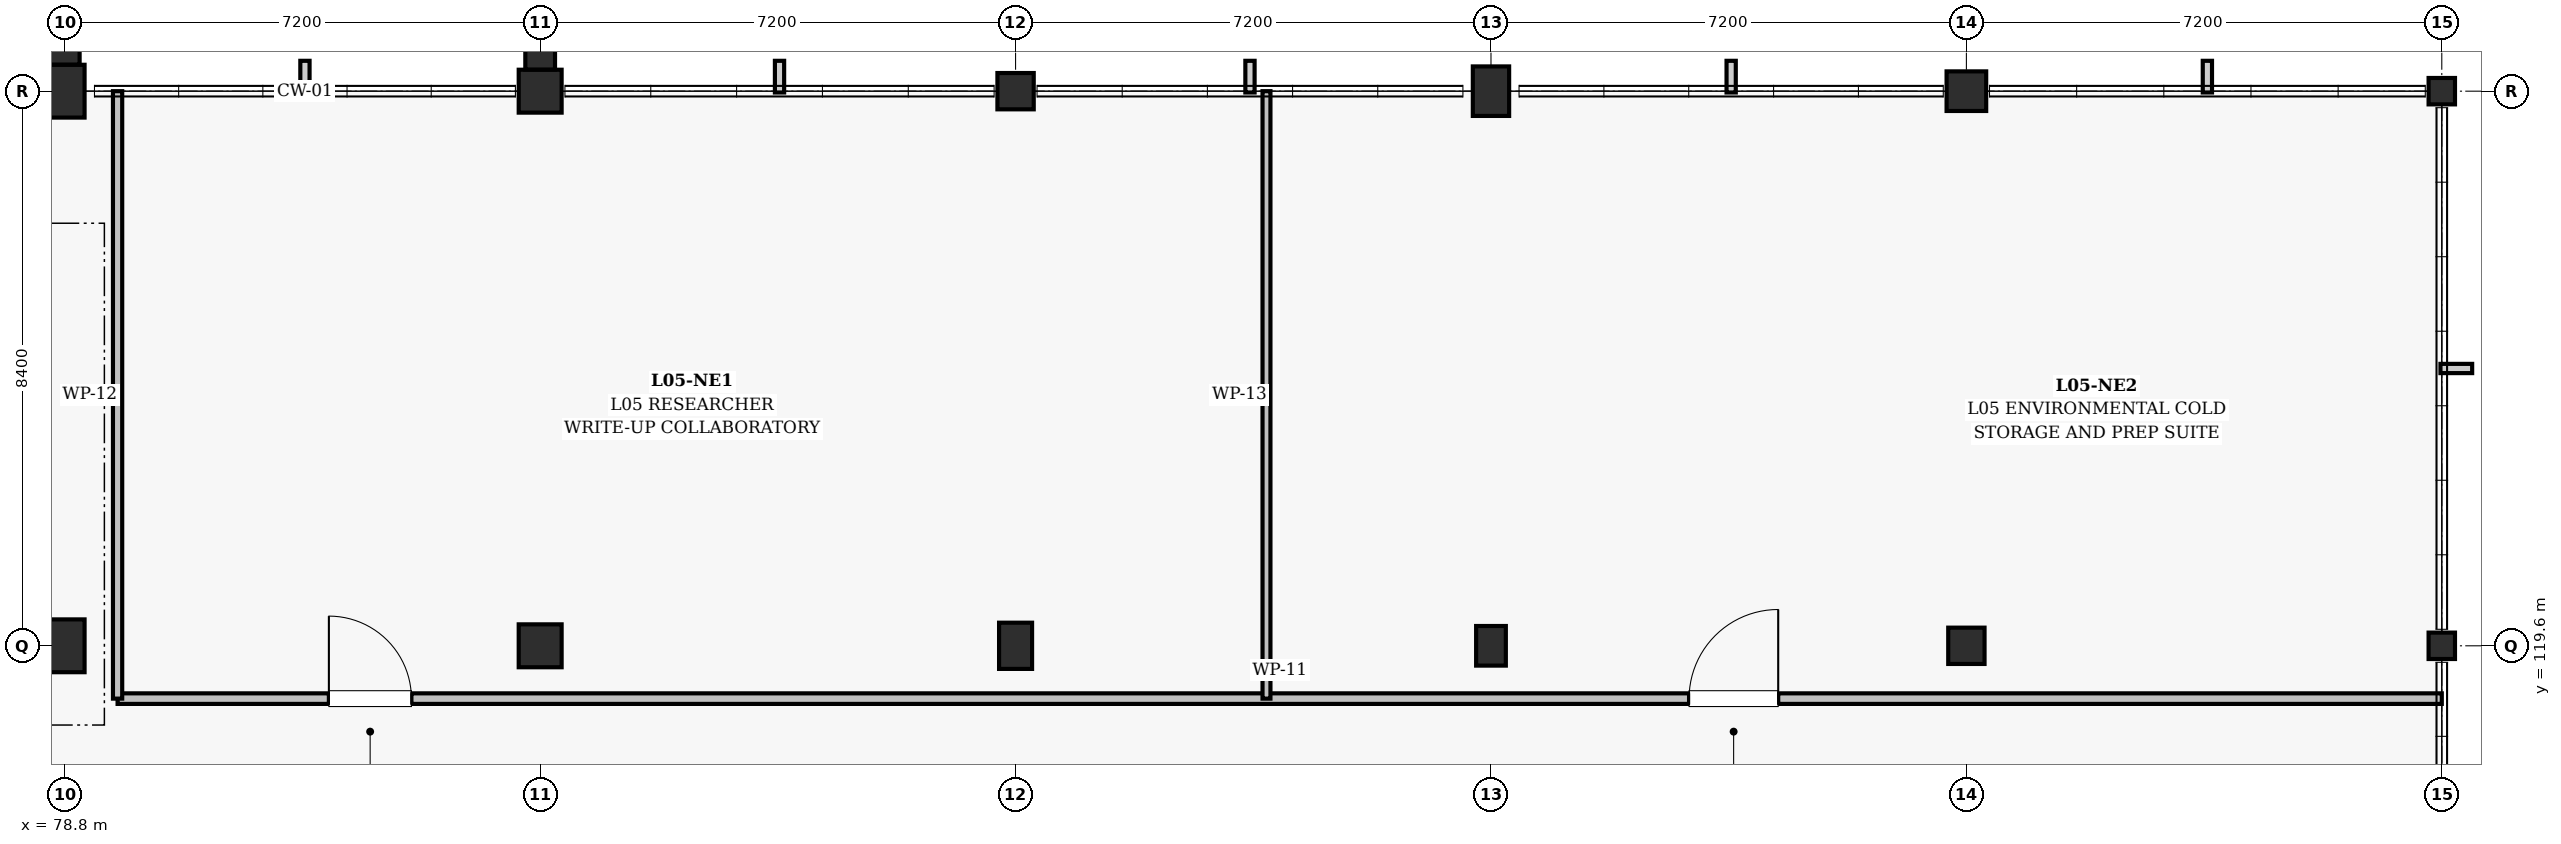
"""IFC4 building model, lengths in metres.
Left out: names, types, materials, properties, quantities, classifications, styles, units other than length and angle.
Written with IfcOpenShell. Run it as: python <this file> out.ifc"""

import sys

from ifc_helpers import new_model, si_unit, direction, frame, frame_2d, origin, origin_2d, place, context, subcontext, project, spatial, rectangle, extrude, element, fill, save


model = new_model("IFC4")
c1 = context("Model", 3, precision=1e-05, world=origin(), true_north=direction((0.0, 1.0)))
c2 = subcontext(c1, "Body", "Model", "MODEL_VIEW")
j1 = project(units=[si_unit("LENGTHUNIT", "METRE"), si_unit("PLANEANGLEUNIT", "RADIAN")], contexts=[c1])
p1 = place(None, origin())
s1 = spatial("IfcSite", under=j1, at=p1, CompositionType="ELEMENT")
p2 = place(p1, origin())
s2 = spatial("IfcBuilding", under=s1, at=p2, CompositionType="ELEMENT")
p3 = place(p2, frame((0.0, 0.0, 23.4)))
s3 = spatial("IfcBuildingStorey", under=s2, at=p3, CompositionType="ELEMENT", Elevation=23.4)
for number, where, z_axis, x_axis in (
    (1, (78.8, 119.6, 0.0), (0.0, 0.0, 1.0), (1.0, 0.0, 0.0)),
    (2, (78.8, 128.0, 0.0), (0.0, 0.0, 1.0), (1.0, 0.0, 0.0)),
):
    element("IfcColumn", number, at=place(p3, frame(where, z_axis=z_axis, x_axis=x_axis)), inside=s3, PredefinedType="COLUMN", context=c2, shape_type="SweptSolid", body=[
        extrude(rectangle(XDim=0.6, YDim=0.8, at=origin_2d()), origin(), (0.0, 0.0, 1.0), 4.5),
    ])
for number, where, z_axis, x_axis in (
    (3, (86.0, 119.6, 0.0), (0.0, 0.0, 1.0), (1.0, 0.0, 0.0)),
    (4, (86.0, 128.0, 0.0), (0.0, 0.0, 1.0), (1.0, 0.0, 0.0)),
):
    element("IfcColumn", number, at=place(p3, frame(where, z_axis=z_axis, x_axis=x_axis)), inside=s3, PredefinedType="COLUMN", context=c2, shape_type="SweptSolid", body=[
        extrude(rectangle(XDim=0.65, YDim=0.65, at=origin_2d()), origin(), (0.0, 0.0, 1.0), 4.5),
    ])
p4 = place(p3, frame((93.2, 119.6, 0.0), z_axis=(0.0, 0.0, 1.0), x_axis=(1.0, 0.0, 0.0)))
e5 = element("IfcColumn", 5, at=p4, inside=s3, PredefinedType="COLUMN", context=c2, shape_type="SweptSolid", body=[
    extrude(rectangle(XDim=0.5, YDim=0.7, at=origin_2d()), origin(), (0.0, 0.0, 1.0), 4.5),
])
p5 = place(p3, frame((93.2, 128.0, 0.0), z_axis=(0.0, 0.0, 1.0), x_axis=(1.0, 0.0, 0.0)))
e6 = element("IfcColumn", 6, at=p5, inside=s3, PredefinedType="COLUMN", context=c2, shape_type="SweptSolid", body=[
    extrude(rectangle(XDim=0.55, YDim=0.55, at=origin_2d()), origin(), (0.0, 0.0, 1.0), 4.5),
])
p6 = place(p3, frame((100.4, 119.6, 0.0), z_axis=(0.0, 0.0, 1.0), x_axis=(1.0, 0.0, 0.0)))
e7 = element("IfcColumn", 7, at=p6, inside=s3, PredefinedType="COLUMN", context=c2, shape_type="SweptSolid", body=[
    extrude(rectangle(XDim=0.45, YDim=0.6, at=origin_2d()), origin(), (0.0, 0.0, 1.0), 4.5),
])
p7 = place(p3, frame((100.4, 128.0, 0.0), z_axis=(0.0, 0.0, 1.0), x_axis=(1.0, 0.0, 0.0)))
e8 = element("IfcColumn", 8, at=p7, inside=s3, PredefinedType="COLUMN", context=c2, shape_type="SweptSolid", body=[
    extrude(rectangle(XDim=0.55, YDim=0.75, at=origin_2d()), origin(), (0.0, 0.0, 1.0), 4.5),
])
p8 = place(p3, frame((107.6, 119.6, 0.0), z_axis=(0.0, 0.0, 1.0), x_axis=(1.0, 0.0, 0.0)))
e9 = element("IfcColumn", 9, at=p8, inside=s3, PredefinedType="COLUMN", context=c2, shape_type="SweptSolid", body=[
    extrude(rectangle(XDim=0.55, YDim=0.55, at=origin_2d()), origin(), (0.0, 0.0, 1.0), 4.5),
])
p9 = place(p3, frame((107.6, 128.0, 0.0), z_axis=(0.0, 0.0, 1.0), x_axis=(1.0, 0.0, 0.0)))
e10 = element("IfcColumn", 10, at=p9, inside=s3, PredefinedType="COLUMN", context=c2, shape_type="SweptSolid", body=[
    extrude(rectangle(XDim=0.6, YDim=0.6, at=origin_2d()), origin(), (0.0, 0.0, 1.0), 4.5),
])
for number, where, z_axis, x_axis in (
    (11, (114.8, 119.6, 0.0), (0.0, 0.0, 1.0), (1.0, 0.0, 0.0)),
    (12, (114.8, 128.0, 0.0), (0.0, 0.0, 1.0), (1.0, 0.0, 0.0)),
):
    element("IfcColumn", number, at=place(p3, frame(where, z_axis=z_axis, x_axis=x_axis)), inside=s3, PredefinedType="COLUMN", context=c2, shape_type="SweptSolid", body=[
        extrude(rectangle(XDim=0.4, YDim=0.4, at=origin_2d()), origin(), (0.0, 0.0, 1.0), 4.5),
    ])
for number, where, z_axis, x_axis in (
    (13, (78.8, 128.728, 0.0), (0.0, 0.0, 1.0), (1.0, 0.0, 0.0)),
    (14, (86.0, 128.653, 0.0), (0.0, 0.0, 1.0), (1.0, 0.0, 0.0)),
):
    element("IfcColumn", number, at=place(p3, frame(where, z_axis=z_axis, x_axis=x_axis)), inside=s3, PredefinedType="PILASTER", context=c2, shape_type="SweptSolid", body=[
        extrude(rectangle(XDim=0.45, YDim=0.65, at=origin_2d()), origin(), (0.0, 0.0, 1.0), 4.5),
    ])
p10 = place(p3, frame((79.6, 118.8, 0.0), z_axis=(0.0, 0.0, 1.0), x_axis=(1.0, 0.0, 0.0)))
e15 = element("IfcWall", 15, at=p10, inside=s3, PredefinedType="PARTITIONING", context=c2, shape_type="SweptSolid", body=[
    extrude(rectangle(XDim=35.2, YDim=0.16, at=frame_2d((17.6, 0.0))), origin(), (0.0, 0.0, 1.0), 2.96),
])
p11 = place(p10, frame((3.2, 0.0, 0.0)))
e16 = element("IfcOpeningElement", 16, at=p11, cuts=e15, PredefinedType="OPENING", context=c2, shape_type="SweptSolid", body=[
    extrude(rectangle(XDim=1.25, YDim=2.2, at=frame_2d((0.625, 1.1))), frame((0.0, 0.09, 0.0), z_axis=(0.0, -1.0, 0.0), x_axis=(1.0, 0.0, 0.0)), (0.0, 0.0, 1.0), 0.18),
])
p12 = place(p10, frame((23.8, 0.0, 0.0)))
e17 = element("IfcOpeningElement", 17, at=p12, cuts=e15, PredefinedType="OPENING", context=c2, shape_type="SweptSolid", body=[
    extrude(rectangle(XDim=1.35, YDim=2.2, at=frame_2d((0.675, 1.1))), frame((0.0, 0.09, 0.0), z_axis=(0.0, -1.0, 0.0), x_axis=(1.0, 0.0, 0.0)), (0.0, 0.0, 1.0), 0.18),
])
p13 = place(p3, frame((79.6, 118.8, 0.0), z_axis=(0.0, 0.0, 1.0), x_axis=(0.0, 1.0, 0.0)))
e18 = element("IfcWall", 18, at=p13, inside=s3, PredefinedType="PARTITIONING", context=c2, shape_type="SweptSolid", body=[
    extrude(rectangle(XDim=9.2, YDim=0.14, at=frame_2d((4.6, 0.0))), origin(), (0.0, 0.0, 1.0), 3.51),
])
p14 = place(p3, frame((97.0, 118.8, 0.0), z_axis=(0.0, 0.0, 1.0), x_axis=(0.0, 1.0, 0.0)))
e19 = element("IfcWall", 19, at=p14, inside=s3, PredefinedType="PARTITIONING", context=c2, shape_type="SweptSolid", body=[
    extrude(rectangle(XDim=9.2, YDim=0.12, at=frame_2d((4.6, 0.0))), origin(), (0.0, 0.0, 1.0), 3.36),
])
p15 = place(p11, origin())
e20 = element("IfcDoor", 20, at=p15, inside=s3, OperationType="SINGLE_SWING_LEFT", PredefinedType="DOOR", context=c2, shape_type="SweptSolid", body=[
    extrude(rectangle(XDim=1.25, YDim=2.2, at=frame_2d((0.625, 1.1))), frame((0.0, 0.025, 0.0), z_axis=(0.0, -1.0, 0.0), x_axis=(1.0, 0.0, 0.0)), (0.0, 0.0, 1.0), 0.05),
])
fill(e16, e20)
p16 = place(p12, origin())
e21 = element("IfcDoor", 21, at=p16, inside=s3, OperationType="SINGLE_SWING_RIGHT", PredefinedType="DOOR", context=c2, shape_type="SweptSolid", body=[
    extrude(rectangle(XDim=1.35, YDim=2.2, at=frame_2d((0.675, 1.1))), frame((0.0, 0.025, 0.0), z_axis=(0.0, -1.0, 0.0), x_axis=(1.0, 0.0, 0.0)), (0.0, 0.0, 1.0), 0.05),
])
fill(e17, e21)
save(model, sys.argv[1])
